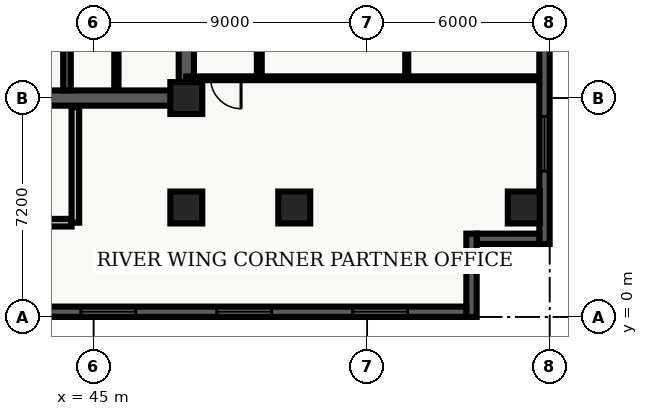
"""IFC4 building model, lengths in metres.
Left out: names, types, materials, properties, quantities, classifications, styles, units other than length and angle.
Written with IfcOpenShell. Run it as: python <this file> out.ifc"""

import sys

from ifc_helpers import new_model, entity, si_unit, converted_unit, direction, frame, origin_with_axes, origin_2d_with_axis, place, context, subcontext, project, spatial, polyline, rectangle, outline, extrude, element, fill, save


model = new_model("IFC4")
c1 = context("Model", 3, precision=1e-05, world=origin_with_axes(), true_north=direction((0.0, 1.0)))
c2 = subcontext(c1, "Body", "Model", "MODEL_VIEW")
j1 = project(units=[si_unit("LENGTHUNIT", "METRE"), converted_unit("PLANEANGLEUNIT", "DEGREE", entity("IfcPlaneAngleMeasure", 0.017), si_unit("PLANEANGLEUNIT", "RADIAN"), dimensions=[0, 0, 0, 0, 0, 0, 0])], contexts=[c1])
p1 = place(None, origin_with_axes())
s1 = spatial("IfcSite", under=j1, at=p1, CompositionType="ELEMENT")
p2 = place(p1, origin_with_axes())
s2 = spatial("IfcBuilding", under=s1, at=p2, CompositionType="ELEMENT")
p3 = place(p2, frame((0.0, 0.0, 160.2), z_axis=(0.0, 0.0, 1.0), x_axis=(1.0, 0.0, 0.0)))
s3 = spatial("IfcBuildingStorey", under=s2, at=p3, CompositionType="ELEMENT", Elevation=160.2)
p4 = place(p3, frame((40.2, 7.2, 0.0), z_axis=(0.0, 0.0, 1.0), x_axis=(1.0, 0.0, 0.0)))
e1 = element("IfcWall", 1, at=p4, inside=s3, PredefinedType="SHEAR", context=c2, shape_type="SweptSolid", body=[
    extrude(outline(polyline([(0.0, -0.25), (7.85, -0.25), (7.85, 0.25), (0.0, 0.25), (0.0, -0.25)])), origin_with_axes(), (0.0, 0.0, 1.0), 3.66),
])
p5 = place(p4, frame((2.175, 0.0, 0.0), z_axis=(0.0, 0.0, 1.0), x_axis=(1.0, 0.0, 0.0)))
e2 = element("IfcOpeningElement", 2, at=p5, cuts=e1, PredefinedType="OPENING", context=c2, shape_type="SweptSolid", body=[
    extrude(rectangle(XDim=1.05, YDim=0.52, at=origin_2d_with_axis()), origin_with_axes(), (0.0, 0.0, 1.0), 2.15),
])
p6 = place(p3, frame((48.05, 7.2, 0.0), z_axis=(0.0, 0.0, 1.0), x_axis=(0.0, 1.0, 0.0)))
e3 = element("IfcWall", 3, at=p6, inside=s3, PredefinedType="SHEAR", context=c2, shape_type="SweptSolid", body=[
    extrude(outline(polyline([(0.0, -0.25), (15.6, -0.25), (15.6, 0.25), (0.0, 0.25), (0.0, -0.25)])), origin_with_axes(), (0.0, 0.0, 1.0), 3.66),
])
p7 = place(p6, frame((5.975, 0.0, 0.0), z_axis=(0.0, 0.0, 1.0), x_axis=(1.0, 0.0, 0.0)))
e4 = element("IfcOpeningElement", 4, at=p7, cuts=e3, PredefinedType="OPENING", context=c2, shape_type="SweptSolid", body=[
    extrude(rectangle(XDim=1.05, YDim=0.52, at=origin_2d_with_axis()), origin_with_axes(), (0.0, 0.0, 1.0), 2.15),
])
p8 = place(p6, frame((2.725, 0.0, 0.0), z_axis=(0.0, 0.0, 1.0), x_axis=(1.0, 0.0, 0.0)))
e5 = element("IfcOpeningElement", 5, at=p8, cuts=e3, PredefinedType="OPENING", context=c2, shape_type="SweptSolid", body=[
    extrude(rectangle(XDim=0.95, YDim=0.52, at=origin_2d_with_axis()), origin_with_axes(), (0.0, 0.0, 1.0), 2.15),
])
p9 = place(p3, frame((44.125, 7.45, 0.0), z_axis=(0.0, 0.0, 1.0), x_axis=(0.0, 1.0, 0.0)))
e6 = element("IfcWall", 6, at=p9, inside=s3, PredefinedType="SHEAR", context=c2, shape_type="SweptSolid", body=[
    extrude(outline(polyline([(0.0, -0.125), (15.1, -0.125), (15.1, 0.125), (0.0, 0.125), (0.0, -0.125)])), origin_with_axes(), (0.0, 0.0, 1.0), 3.66),
])
p10 = place(p3, frame((40.325, 3.1, 0.0), z_axis=(0.0, 0.0, 1.0), x_axis=(1.0, 0.0, 0.0)))
e7 = element("IfcWall", 7, at=p10, inside=s3, PredefinedType="SOLIDWALL", context=c2, shape_type="SweptSolid", body=[
    extrude(outline(polyline([(0.0, -0.125), (3.95, -0.125), (3.95, 0.125), (0.0, 0.125), (0.0, -0.125)])), origin_with_axes(), (0.0, 0.0, 1.0), 2.7),
])
p11 = place(p3, frame((44.4, 3.1, 0.0), z_axis=(0.0, 0.0, 1.0), x_axis=(0.0, 1.0, 0.0)))
e8 = element("IfcWall", 8, at=p11, inside=s3, PredefinedType="SOLIDWALL", context=c2, shape_type="SweptSolid", body=[
    extrude(outline(polyline([(0.0, -0.125), (3.8, -0.125), (3.8, 0.125), (0.0, 0.125), (0.0, -0.125)])), origin_with_axes(), (0.0, 0.0, 1.0), 2.7),
])
for number, where, z_axis, x_axis in (
    (9, (48.05, 3.6, 0.0), (0.0, 0.0, 1.0), (1.0, 0.0, 0.0)),
    (10, (48.05, 7.2, 0.0), (0.0, 0.0, 1.0), (1.0, 0.0, 0.0)),
    (11, (51.6, 3.6, 0.0), (0.0, 0.0, 1.0), (1.0, 0.0, 0.0)),
    (12, (59.15, 3.6, 0.0), (0.0, 0.0, 1.0), (1.0, 0.0, 0.0)),
):
    element("IfcColumn", number, at=place(p3, frame(where, z_axis=z_axis, x_axis=x_axis)), inside=s3, PredefinedType="COLUMN", context=c2, shape_type="SweptSolid", body=[
        extrude(rectangle(XDim=1.05, YDim=1.05, at=origin_2d_with_axis()), origin_with_axes(), (0.0, 0.0, 1.0), 3.9),
    ])
p12 = place(p3, frame((45.75, 7.5, 0.0), z_axis=(0.0, 0.0, 1.0), x_axis=(0.0, 1.0, 0.0)))
e13 = element("IfcWall", 13, at=p12, inside=s3, PredefinedType="PARTITIONING", context=c2, shape_type="SweptSolid", body=[
    extrude(outline(polyline([(0.0, -0.07), (4.08, -0.07), (4.08, 0.07), (0.0, 0.07), (0.0, -0.07)])), origin_with_axes(), (0.0, 0.0, 1.0), 2.7),
])
p13 = place(p12, frame((2.0, 0.0, 0.0), z_axis=(0.0, 0.0, 1.0), x_axis=(1.0, 0.0, 0.0)))
e14 = element("IfcOpeningElement", 14, at=p13, cuts=e13, PredefinedType="OPENING", context=c2, shape_type="SweptSolid", body=[
    extrude(rectangle(XDim=0.9, YDim=0.16, at=origin_2d_with_axis()), origin_with_axes(), (0.0, 0.0, 1.0), 2.15),
])
p14 = place(p3, frame((50.45, 7.85, 0.0), z_axis=(0.0, 0.0, 1.0), x_axis=(0.0, 1.0, 0.0)))
e15 = element("IfcWall", 15, at=p14, inside=s3, PredefinedType="PARTITIONING", context=c2, shape_type="SweptSolid", body=[
    extrude(outline(polyline([(0.0, -0.08), (18.8, -0.08), (18.8, 0.08), (0.0, 0.08), (0.0, -0.08)])), origin_with_axes(), (0.0, 0.0, 1.0), 2.7),
])
p15 = place(p14, frame((4.12, 0.0, 0.0), z_axis=(0.0, 0.0, 1.0), x_axis=(1.0, 0.0, 0.0)))
e16 = element("IfcOpeningElement", 16, at=p15, cuts=e15, PredefinedType="OPENING", context=c2, shape_type="SweptSolid", body=[
    extrude(rectangle(XDim=1.0, YDim=0.18, at=origin_2d_with_axis()), origin_with_axes(), (0.0, 0.0, 1.0), 2.15),
])
p16 = place(p14, frame((13.46, 0.0, 0.0), z_axis=(0.0, 0.0, 1.0), x_axis=(1.0, 0.0, 0.0)))
e17 = element("IfcOpeningElement", 17, at=p16, cuts=e15, PredefinedType="OPENING", context=c2, shape_type="SweptSolid", body=[
    extrude(rectangle(XDim=1.0, YDim=0.18, at=origin_2d_with_axis()), origin_with_axes(), (0.0, 0.0, 1.0), 2.15),
])
p17 = place(p3, frame((59.665, 7.85, 0.0), z_axis=(0.0, 0.0, 1.0), x_axis=(-1.0, 0.0, 0.0)))
e18 = element("IfcWall", 18, at=p17, inside=s3, PredefinedType="PARTITIONING", context=c2, shape_type="SweptSolid", body=[
    extrude(outline(polyline([(0.0, -0.062), (11.615, -0.062), (11.615, 0.062), (0.0, 0.062), (0.0, -0.062)])), origin_with_axes(), (0.0, 0.0, 1.0), 2.7),
])
p18 = place(p17, frame((10.315, 0.0, 0.0), z_axis=(0.0, 0.0, 1.0), x_axis=(1.0, 0.0, 0.0)))
e19 = element("IfcOpeningElement", 19, at=p18, cuts=e18, PredefinedType="OPENING", context=c2, shape_type="SweptSolid", body=[
    extrude(rectangle(XDim=1.0, YDim=0.145, at=origin_2d_with_axis()), origin_with_axes(), (0.0, 0.0, 1.0), 2.15),
])
p19 = place(p3, frame((55.3, 7.98, 0.0), z_axis=(0.0, 0.0, 1.0), x_axis=(0.0, 1.0, 0.0)))
e20 = element("IfcWall", 20, at=p19, inside=s3, PredefinedType="PARTITIONING", context=c2, shape_type="SweptSolid", body=[
    extrude(outline(polyline([(0.0, -0.05), (18.54, -0.05), (18.54, 0.05), (0.0, 0.05), (0.0, -0.05)])), origin_with_axes(), (0.0, 0.0, 1.0), 2.7),
])
p20 = place(p19, frame((3.99, 0.0, 0.0), z_axis=(0.0, 0.0, 1.0), x_axis=(1.0, 0.0, 0.0)))
e21 = element("IfcOpeningElement", 21, at=p20, cuts=e20, PredefinedType="OPENING", context=c2, shape_type="SweptSolid", body=[
    extrude(rectangle(XDim=0.95, YDim=0.12, at=origin_2d_with_axis()), origin_with_axes(), (0.0, 0.0, 1.0), 2.15),
])
p21 = place(p19, frame((13.331, 0.0, 0.0), z_axis=(0.0, 0.0, 1.0), x_axis=(1.0, 0.0, 0.0)))
e22 = element("IfcOpeningElement", 22, at=p21, cuts=e20, PredefinedType="OPENING", context=c2, shape_type="SweptSolid", body=[
    extrude(rectangle(XDim=0.95, YDim=0.12, at=origin_2d_with_axis()), origin_with_axes(), (0.0, 0.0, 1.0), 2.15),
])
p22 = place(p3, frame((59.83, 26.06, 0.0), z_axis=(0.0, 0.0, 1.0), x_axis=(0.0, -1.0, 0.0)))
e23 = element("IfcWall", 23, at=p22, inside=s3, PredefinedType="SOLIDWALL", context=c2, shape_type="SweptSolid", body=[
    extrude(outline(polyline([(0.0, -0.17), (23.66, -0.17), (23.66, 0.17), (0.0, 0.17), (0.0, -0.17)])), origin_with_axes(), (0.0, 0.0, 1.0), 3.66),
])
p23 = place(p22, frame((3.696, 0.0, 0.45), z_axis=(0.0, 0.0, 1.0), x_axis=(1.0, 0.0, 0.0)))
e24 = element("IfcOpeningElement", 24, at=p23, cuts=e23, PredefinedType="OPENING", context=c2, shape_type="SweptSolid", body=[
    extrude(rectangle(XDim=1.8, YDim=0.36, at=origin_2d_with_axis()), origin_with_axes(), (0.0, 0.0, 1.0), 2.1),
])
p24 = place(p22, frame((11.83, 0.0, 0.45), z_axis=(0.0, 0.0, 1.0), x_axis=(1.0, 0.0, 0.0)))
e25 = element("IfcOpeningElement", 25, at=p24, cuts=e23, PredefinedType="OPENING", context=c2, shape_type="SweptSolid", body=[
    extrude(rectangle(XDim=1.8, YDim=0.36, at=origin_2d_with_axis()), origin_with_axes(), (0.0, 0.0, 1.0), 2.1),
])
p25 = place(p22, frame((20.364, 0.0, 0.45), z_axis=(0.0, 0.0, 1.0), x_axis=(1.0, 0.0, 0.0)))
e26 = element("IfcOpeningElement", 26, at=p25, cuts=e23, PredefinedType="OPENING", context=c2, shape_type="SweptSolid", body=[
    extrude(rectangle(XDim=1.8, YDim=0.36, at=origin_2d_with_axis()), origin_with_axes(), (0.0, 0.0, 1.0), 2.1),
])
p26 = place(p3, frame((59.66, 2.57, 0.0), z_axis=(0.0, 0.0, 1.0), x_axis=(-1.0, 0.0, 0.0)))
e27 = element("IfcWall", 27, at=p26, inside=s3, PredefinedType="SOLIDWALL", context=c2, shape_type="SweptSolid", body=[
    extrude(outline(polyline([(0.0, -0.17), (2.06, -0.17), (2.06, 0.17), (0.0, 0.17), (0.0, -0.17)])), origin_with_axes(), (0.0, 0.0, 1.0), 3.66),
])
p27 = place(p3, frame((57.43, 2.74, 0.0), z_axis=(0.0, 0.0, 1.0), x_axis=(0.0, -1.0, 0.0)))
e28 = element("IfcWall", 28, at=p27, inside=s3, PredefinedType="SOLIDWALL", context=c2, shape_type="SweptSolid", body=[
    extrude(outline(polyline([(0.0, -0.17), (2.74, -0.17), (2.74, 0.17), (0.0, 0.17), (0.0, -0.17)])), origin_with_axes(), (0.0, 0.0, 1.0), 3.66),
])
p28 = place(p3, frame((57.26, 0.17, 0.0), z_axis=(0.0, 0.0, 1.0), x_axis=(-1.0, 0.0, 0.0)))
e29 = element("IfcWall", 29, at=p28, inside=s3, PredefinedType="SOLIDWALL", context=c2, shape_type="SweptSolid", body=[
    extrude(outline(polyline([(0.0, -0.17), (54.86, -0.17), (54.86, 0.17), (0.0, 0.17), (0.0, -0.17)])), origin_with_axes(), (0.0, 0.0, 1.0), 3.66),
])
p29 = place(p28, frame((2.836, 0.0, 0.45), z_axis=(0.0, 0.0, 1.0), x_axis=(1.0, 0.0, 0.0)))
e30 = element("IfcOpeningElement", 30, at=p29, cuts=e29, PredefinedType="OPENING", context=c2, shape_type="SweptSolid", body=[
    extrude(rectangle(XDim=1.8, YDim=0.36, at=origin_2d_with_axis()), origin_with_axes(), (0.0, 0.0, 1.0), 2.1),
])
p30 = place(p28, frame((7.307, 0.0, 0.45), z_axis=(0.0, 0.0, 1.0), x_axis=(1.0, 0.0, 0.0)))
e31 = element("IfcOpeningElement", 31, at=p30, cuts=e29, PredefinedType="OPENING", context=c2, shape_type="SweptSolid", body=[
    extrude(rectangle(XDim=1.8, YDim=0.36, at=origin_2d_with_axis()), origin_with_axes(), (0.0, 0.0, 1.0), 2.1),
])
p31 = place(p28, frame((11.779, 0.0, 0.45), z_axis=(0.0, 0.0, 1.0), x_axis=(1.0, 0.0, 0.0)))
e32 = element("IfcOpeningElement", 32, at=p31, cuts=e29, PredefinedType="OPENING", context=c2, shape_type="SweptSolid", body=[
    extrude(rectangle(XDim=1.8, YDim=0.36, at=origin_2d_with_axis()), origin_with_axes(), (0.0, 0.0, 1.0), 2.1),
])
p32 = place(p28, frame((16.251, 0.0, 0.45), z_axis=(0.0, 0.0, 1.0), x_axis=(1.0, 0.0, 0.0)))
e33 = element("IfcOpeningElement", 33, at=p32, cuts=e29, PredefinedType="OPENING", context=c2, shape_type="SweptSolid", body=[
    extrude(rectangle(XDim=1.8, YDim=0.36, at=origin_2d_with_axis()), origin_with_axes(), (0.0, 0.0, 1.0), 2.1),
])
p33 = place(p28, frame((20.723, 0.0, 0.45), z_axis=(0.0, 0.0, 1.0), x_axis=(1.0, 0.0, 0.0)))
e34 = element("IfcOpeningElement", 34, at=p33, cuts=e29, PredefinedType="OPENING", context=c2, shape_type="SweptSolid", body=[
    extrude(rectangle(XDim=1.8, YDim=0.36, at=origin_2d_with_axis()), origin_with_axes(), (0.0, 0.0, 1.0), 2.1),
])
p34 = place(p28, frame((25.194, 0.0, 0.45), z_axis=(0.0, 0.0, 1.0), x_axis=(1.0, 0.0, 0.0)))
e35 = element("IfcOpeningElement", 35, at=p34, cuts=e29, PredefinedType="OPENING", context=c2, shape_type="SweptSolid", body=[
    extrude(rectangle(XDim=1.8, YDim=0.36, at=origin_2d_with_axis()), origin_with_axes(), (0.0, 0.0, 1.0), 2.1),
])
p35 = place(p28, frame((34.138, 0.0, 0.45), z_axis=(0.0, 0.0, 1.0), x_axis=(1.0, 0.0, 0.0)))
e36 = element("IfcOpeningElement", 36, at=p35, cuts=e29, PredefinedType="OPENING", context=c2, shape_type="SweptSolid", body=[
    extrude(rectangle(XDim=1.8, YDim=0.36, at=origin_2d_with_axis()), origin_with_axes(), (0.0, 0.0, 1.0), 2.1),
])
p36 = place(p28, frame((38.609, 0.0, 0.45), z_axis=(0.0, 0.0, 1.0), x_axis=(1.0, 0.0, 0.0)))
e37 = element("IfcOpeningElement", 37, at=p36, cuts=e29, PredefinedType="OPENING", context=c2, shape_type="SweptSolid", body=[
    extrude(rectangle(XDim=1.8, YDim=0.36, at=origin_2d_with_axis()), origin_with_axes(), (0.0, 0.0, 1.0), 2.1),
])
p37 = place(p28, frame((42.231, 0.0, 0.45), z_axis=(0.0, 0.0, 1.0), x_axis=(1.0, 0.0, 0.0)))
e38 = element("IfcOpeningElement", 38, at=p37, cuts=e29, PredefinedType="OPENING", context=c2, shape_type="SweptSolid", body=[
    extrude(rectangle(XDim=1.8, YDim=0.36, at=origin_2d_with_axis()), origin_with_axes(), (0.0, 0.0, 1.0), 2.1),
])
p38 = place(p28, frame((47.553, 0.0, 0.45), z_axis=(0.0, 0.0, 1.0), x_axis=(1.0, 0.0, 0.0)))
e39 = element("IfcOpeningElement", 39, at=p38, cuts=e29, PredefinedType="OPENING", context=c2, shape_type="SweptSolid", body=[
    extrude(rectangle(XDim=1.8, YDim=0.36, at=origin_2d_with_axis()), origin_with_axes(), (0.0, 0.0, 1.0), 2.1),
])
p39 = place(p28, frame((52.024, 0.0, 0.45), z_axis=(0.0, 0.0, 1.0), x_axis=(1.0, 0.0, 0.0)))
e40 = element("IfcOpeningElement", 40, at=p39, cuts=e29, PredefinedType="OPENING", context=c2, shape_type="SweptSolid", body=[
    extrude(rectangle(XDim=1.8, YDim=0.36, at=origin_2d_with_axis()), origin_with_axes(), (0.0, 0.0, 1.0), 2.1),
])
p40 = place(p17, frame((10.315, 0.0, 0.0), z_axis=(0.0, 0.0, 1.0), x_axis=(1.0, 0.0, 0.0)))
e41 = element("IfcDoor", 41, at=p40, inside=s3, OperationType="SINGLE_SWING_LEFT", PredefinedType="DOOR", context=c2, shape_type="SweptSolid", body=[
    extrude(rectangle(XDim=1.0, YDim=0.075, at=origin_2d_with_axis()), origin_with_axes(), (0.0, 0.0, 1.0), 2.15),
])
fill(e19, e41)
p41 = place(p22, frame((20.364, 0.0, 0.45), z_axis=(0.0, 0.0, 1.0), x_axis=(1.0, 0.0, 0.0)))
e42 = element("IfcWindow", 42, at=p41, inside=s3, PredefinedType="WINDOW", context=c2, shape_type="SweptSolid", body=[
    extrude(rectangle(XDim=1.8, YDim=0.09, at=origin_2d_with_axis()), origin_with_axes(), (0.0, 0.0, 1.0), 2.1),
])
fill(e26, e42)
p42 = place(p28, frame((2.836, 0.0, 0.45), z_axis=(0.0, 0.0, 1.0), x_axis=(1.0, 0.0, 0.0)))
e43 = element("IfcWindow", 43, at=p42, inside=s3, PredefinedType="WINDOW", context=c2, shape_type="SweptSolid", body=[
    extrude(rectangle(XDim=1.8, YDim=0.09, at=origin_2d_with_axis()), origin_with_axes(), (0.0, 0.0, 1.0), 2.1),
])
fill(e30, e43)
p43 = place(p28, frame((7.307, 0.0, 0.45), z_axis=(0.0, 0.0, 1.0), x_axis=(1.0, 0.0, 0.0)))
e44 = element("IfcWindow", 44, at=p43, inside=s3, PredefinedType="WINDOW", context=c2, shape_type="SweptSolid", body=[
    extrude(rectangle(XDim=1.8, YDim=0.09, at=origin_2d_with_axis()), origin_with_axes(), (0.0, 0.0, 1.0), 2.1),
])
fill(e31, e44)
p44 = place(p28, frame((11.779, 0.0, 0.45), z_axis=(0.0, 0.0, 1.0), x_axis=(1.0, 0.0, 0.0)))
e45 = element("IfcWindow", 45, at=p44, inside=s3, PredefinedType="WINDOW", context=c2, shape_type="SweptSolid", body=[
    extrude(rectangle(XDim=1.8, YDim=0.09, at=origin_2d_with_axis()), origin_with_axes(), (0.0, 0.0, 1.0), 2.1),
])
fill(e32, e45)
save(model, sys.argv[1])
